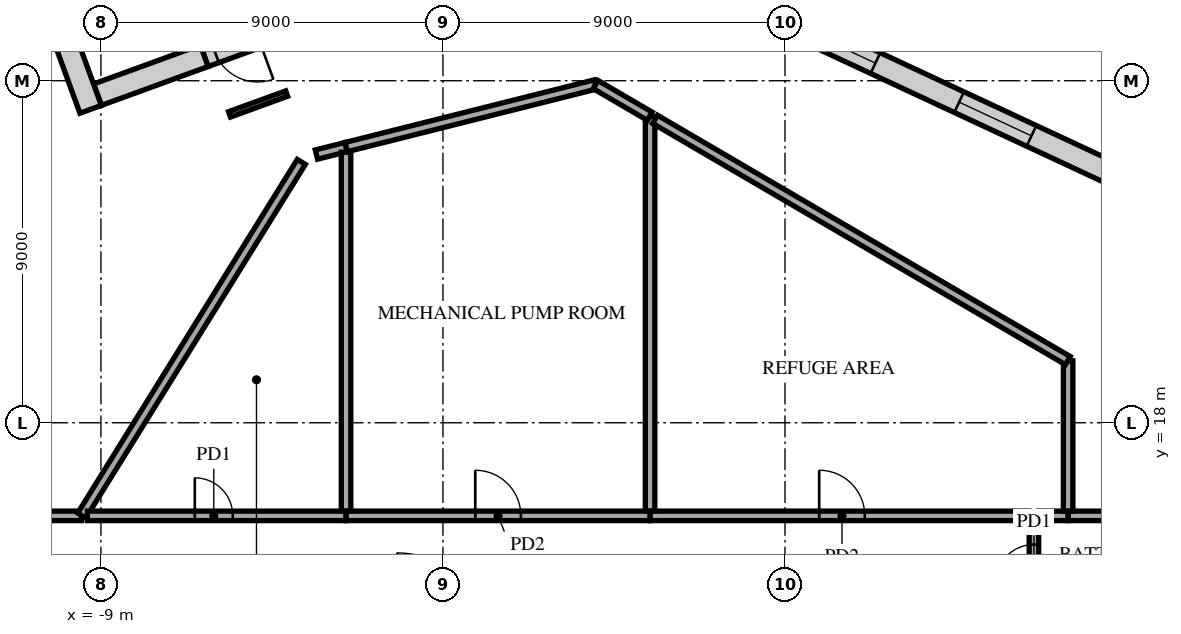
"""IFC4 building model, lengths in metres.
Left out: names, types, materials, properties, quantities, classifications, styles, units other than length and angle.
Written with IfcOpenShell. Run it as: python <this file> out.ifc"""

import sys

from ifc_helpers import new_model, si_unit, direction, frame, frame_2d, origin, place, context, subcontext, project, spatial, rectangle, extrude, element, fill, save


model = new_model("IFC4")
c1 = context("Model", 3, precision=1e-05, world=origin(), true_north=direction((0.0, 1.0)))
c2 = subcontext(c1, "Body", "Model", "MODEL_VIEW")
j1 = project(units=[si_unit("LENGTHUNIT", "METRE"), si_unit("PLANEANGLEUNIT", "RADIAN")], contexts=[c1])
p1 = place(None, origin())
s1 = spatial("IfcSite", under=j1, at=p1, CompositionType="ELEMENT")
p2 = place(p1, origin())
s2 = spatial("IfcBuilding", under=s1, at=p2, CompositionType="ELEMENT")
p3 = place(p2, frame((0.0, 0.0, 290.9)))
s3 = spatial("IfcBuildingStorey", under=s2, at=p3, CompositionType="ELEMENT", Elevation=290.9)
p4 = place(p3, frame((15.55, 13.045, 0.0), z_axis=(0.0, 0.0, 1.0), x_axis=(0.0, 1.0, 0.0)))
e1 = element("IfcWall", 1, at=p4, inside=s3, PredefinedType="PARTITIONING", context=c2, shape_type="SweptSolid", body=[
    extrude(rectangle(XDim=2.505, YDim=0.25, at=frame_2d((1.252, 0.0))), origin(), (0.0, 0.0, 1.0), 4.73),
])
p5 = place(p4, frame((0.75, 0.0, 0.0)))
e2 = element("IfcOpeningElement", 2, at=p5, cuts=e1, PredefinedType="OPENING", context=c2, shape_type="SweptSolid", body=[
    extrude(rectangle(XDim=1.0, YDim=2.1, at=frame_2d((0.5, 1.05))), frame((0.0, 0.135, 0.0), z_axis=(0.0, -1.0, 0.0), x_axis=(1.0, 0.0, 0.0)), (0.0, 0.0, 1.0), 0.27),
])
p6 = place(p3, frame((-15.42, 15.55, 0.0), z_axis=(0.0, 0.0, 1.0), x_axis=(1.0, 0.0, 0.0)))
e3 = element("IfcWall", 3, at=p6, inside=s3, PredefinedType="PARTITIONING", context=c2, shape_type="SweptSolid", body=[
    extrude(rectangle(XDim=5.91, YDim=0.25, at=frame_2d((2.955, 0.0))), origin(), (0.0, 0.0, 1.0), 4.43),
])
p7 = place(p3, frame((-9.505, 15.558, 0.0), z_axis=(0.0, 0.0, 1.0), x_axis=(0.527494346157, 0.84955854111, 0.0)))
e4 = element("IfcWall", 4, at=p7, inside=s3, PredefinedType="PARTITIONING", context=c2, shape_type="SweptSolid", body=[
    extrude(rectangle(XDim=10.954, YDim=0.25, at=frame_2d((5.477, 0.0))), origin(), (0.0, 0.0, 1.0), 4.73),
])
p8 = place(p3, frame((-9.357, 15.55, 0.0), z_axis=(0.0, 0.0, 1.0), x_axis=(1.0, 0.0, 0.0)))
e5 = element("IfcWall", 5, at=p8, inside=s3, PredefinedType="PARTITIONING", context=c2, shape_type="SweptSolid", body=[
    extrude(rectangle(XDim=6.807, YDim=0.25, at=frame_2d((3.404, 0.0))), origin(), (0.0, 0.0, 1.0), 4.73),
])
p9 = place(p8, frame((2.827, 0.0, 0.0)))
e6 = element("IfcOpeningElement", 6, at=p9, cuts=e5, PredefinedType="OPENING", context=c2, shape_type="SweptSolid", body=[
    extrude(rectangle(XDim=1.0, YDim=2.1, at=frame_2d((0.5, 1.05))), frame((0.0, 0.135, 0.0), z_axis=(0.0, -1.0, 0.0), x_axis=(1.0, 0.0, 0.0)), (0.0, 0.0, 1.0), 0.27),
])
p10 = place(p3, frame((-2.545, 15.55, 0.0), z_axis=(0.0, 0.0, 1.0), x_axis=(1.0, 0.0, 0.0)))
e7 = element("IfcWall", 7, at=p10, inside=s3, PredefinedType="PARTITIONING", context=c2, shape_type="SweptSolid", body=[
    extrude(rectangle(XDim=7.995, YDim=0.25, at=frame_2d((3.998, 0.0))), origin(), (0.0, 0.0, 1.0), 4.73),
])
p11 = place(p10, frame((3.395, 0.0, 0.0)))
e8 = element("IfcOpeningElement", 8, at=p11, cuts=e7, PredefinedType="OPENING", context=c2, shape_type="SweptSolid", body=[
    extrude(rectangle(XDim=1.2, YDim=2.1, at=frame_2d((0.6, 1.05))), frame((0.0, 0.135, 0.0), z_axis=(0.0, -1.0, 0.0), x_axis=(1.0, 0.0, 0.0)), (0.0, 0.0, 1.0), 0.27),
])
p12 = place(p3, frame((5.455, 15.55, 0.0), z_axis=(0.0, 0.0, 1.0), x_axis=(1.0, 0.0, 0.0)))
e9 = element("IfcWall", 9, at=p12, inside=s3, PredefinedType="PARTITIONING", context=c2, shape_type="SweptSolid", body=[
    extrude(rectangle(XDim=9.965, YDim=0.25, at=frame_2d((4.982, 0.0))), origin(), (0.0, 0.0, 1.0), 4.73),
])
p13 = place(p12, frame((4.445, 0.0, 0.0)))
e10 = element("IfcOpeningElement", 10, at=p13, cuts=e9, PredefinedType="OPENING", context=c2, shape_type="SweptSolid", body=[
    extrude(rectangle(XDim=1.2, YDim=2.1, at=frame_2d((0.6, 1.05))), frame((0.0, 0.135, 0.0), z_axis=(0.0, -1.0, 0.0), x_axis=(1.0, 0.0, 0.0)), (0.0, 0.0, 1.0), 0.27),
])
p14 = place(p3, frame((15.68, 15.55, 0.0), z_axis=(0.0, 0.0, 1.0), x_axis=(1.0, 0.0, 0.0)))
e11 = element("IfcWall", 11, at=p14, inside=s3, PredefinedType="PARTITIONING", context=c2, shape_type="SweptSolid", body=[
    extrude(rectangle(XDim=0.77, YDim=0.25, at=frame_2d((0.385, 0.0))), origin(), (0.0, 0.0, 1.0), 5.25),
])
p15 = place(p3, frame((16.455, 15.55, 0.0), z_axis=(0.0, 0.0, 1.0), x_axis=(1.0, 0.0, 0.0)))
e12 = element("IfcWall", 12, at=p15, inside=s3, PredefinedType="PARTITIONING", context=c2, shape_type="SweptSolid", body=[
    extrude(rectangle(XDim=5.668, YDim=0.25, at=frame_2d((2.834, 0.0))), origin(), (0.0, 0.0, 1.0), 4.73),
])
p16 = place(p3, frame((16.45, 15.68, 0.0), z_axis=(0.0, 0.0, 1.0), x_axis=(0.0, 1.0, 0.0)))
e13 = element("IfcWall", 13, at=p16, inside=s3, PredefinedType="PARTITIONING", context=c2, shape_type="SweptSolid", body=[
    extrude(rectangle(XDim=3.952, YDim=0.25, at=frame_2d((1.976, 0.0))), origin(), (0.0, 0.0, 1.0), 4.73),
])
p17 = place(p3, frame((-3.33, 25.057, 0.0), z_axis=(0.0, 0.0, 1.0), x_axis=(0.969820148619, 0.243821408685, 0.0)))
e14 = element("IfcWall", 14, at=p17, inside=s3, PredefinedType="PARTITIONING", context=c2, shape_type="SweptSolid", body=[
    extrude(rectangle(XDim=0.804, YDim=0.25, at=frame_2d((0.402, 0.0))), origin(), (0.0, 0.0, 1.0), 5.25),
])
p18 = place(p3, frame((-2.55, 15.68, 0.0), z_axis=(0.0, 0.0, 1.0), x_axis=(0.0, 1.0, 0.0)))
e15 = element("IfcWall", 15, at=p18, inside=s3, PredefinedType="PARTITIONING", context=c2, shape_type="SweptSolid", body=[
    extrude(rectangle(XDim=9.439, YDim=0.25, at=frame_2d((4.72, 0.0))), origin(), (0.0, 0.0, 1.0), 5.25),
])
p19 = place(p3, frame((-2.545, 25.255, 0.0), z_axis=(0.0, 0.0, 1.0), x_axis=(0.969855051693, 0.243682536725, 0.0)))
e16 = element("IfcWall", 16, at=p19, inside=s3, PredefinedType="PARTITIONING", context=c2, shape_type="SweptSolid", body=[
    extrude(rectangle(XDim=6.761, YDim=0.25, at=frame_2d((3.38, 0.0))), origin(), (0.0, 0.0, 1.0), 4.416),
])
p20 = place(p3, frame((5.45, 15.68, 0.0), z_axis=(0.0, 0.0, 1.0), x_axis=(0.0, 1.0, 0.0)))
e17 = element("IfcWall", 17, at=p20, inside=s3, PredefinedType="PARTITIONING", context=c2, shape_type="SweptSolid", body=[
    extrude(rectangle(XDim=10.381, YDim=0.25, at=frame_2d((5.191, 0.0))), origin(), (0.0, 0.0, 1.0), 5.25),
])
p21 = place(p3, frame((5.58, 25.985, 0.0), z_axis=(0.0, 0.0, 1.0), x_axis=(0.863333734734, -0.504633394129, 0.0)))
e18 = element("IfcWall", 18, at=p21, inside=s3, PredefinedType="PARTITIONING", context=c2, shape_type="SweptSolid", body=[
    extrude(rectangle(XDim=12.581, YDim=0.25, at=frame_2d((6.29, 0.0))), origin(), (0.0, 0.0, 1.0), 4.73),
])
p22 = place(p3, frame((4.018, 26.898, 0.0), z_axis=(0.0, 0.0, 1.0), x_axis=(0.863392044952, -0.504533622976, 0.0)))
e19 = element("IfcWall", 19, at=p22, inside=s3, PredefinedType="PARTITIONING", context=c2, shape_type="SweptSolid", body=[
    extrude(rectangle(XDim=1.649, YDim=0.25, at=frame_2d((0.825, 0.0))), origin(), (0.0, 0.0, 1.0), 4.416),
])
p23 = place(p3, frame((28.904, 19.292, 0.0), z_axis=(0.0, 0.0, 1.0), x_axis=(-0.906308899711, 0.422615875594, 0.0)))
e20 = element("IfcWall", 20, at=p23, inside=s3, PredefinedType="STANDARD", context=c2, shape_type="SweptSolid", body=[
    extrude(rectangle(XDim=36.243, YDim=0.6, at=frame_2d((18.122, 0.0))), origin(), (0.0, 0.0, 1.0), 5.25),
])
p24 = place(p23, frame((1.215, 0.0, 0.6)))
e21 = element("IfcOpeningElement", 21, at=p24, cuts=e20, PredefinedType="OPENING", context=c2, shape_type="SweptSolid", body=[
    extrude(rectangle(XDim=2.1, YDim=4.2, at=frame_2d((1.05, 2.1))), frame((0.0, 0.31, 0.0), z_axis=(0.0, -1.0, 0.0), x_axis=(1.0, 0.0, 0.0)), (0.0, 0.0, 1.0), 0.62),
])
p25 = place(p23, frame((14.806, 0.0, 0.6)))
e22 = element("IfcOpeningElement", 22, at=p25, cuts=e20, PredefinedType="OPENING", context=c2, shape_type="SweptSolid", body=[
    extrude(rectangle(XDim=2.1, YDim=4.2, at=frame_2d((1.05, 2.1))), frame((0.0, 0.31, 0.0), z_axis=(0.0, -1.0, 0.0), x_axis=(1.0, 0.0, 0.0)), (0.0, 0.0, 1.0), 0.62),
])
p26 = place(p23, frame((19.337, 0.0, 0.6)))
e23 = element("IfcOpeningElement", 23, at=p26, cuts=e20, PredefinedType="OPENING", context=c2, shape_type="SweptSolid", body=[
    extrude(rectangle(XDim=2.1, YDim=4.2, at=frame_2d((1.05, 2.1))), frame((0.0, 0.31, 0.0), z_axis=(0.0, -1.0, 0.0), x_axis=(1.0, 0.0, 0.0)), (0.0, 0.0, 1.0), 0.62),
])
p27 = place(p23, frame((23.867, 0.0, 0.6)))
e24 = element("IfcOpeningElement", 24, at=p27, cuts=e20, PredefinedType="OPENING", context=c2, shape_type="SweptSolid", body=[
    extrude(rectangle(XDim=2.1, YDim=4.2, at=frame_2d((1.05, 2.1))), frame((0.0, 0.31, 0.0), z_axis=(0.0, -1.0, 0.0), x_axis=(1.0, 0.0, 0.0)), (0.0, 0.0, 1.0), 0.62),
])
p28 = place(p23, frame((28.398, 0.0, 0.6)))
e25 = element("IfcOpeningElement", 25, at=p28, cuts=e20, PredefinedType="OPENING", context=c2, shape_type="SweptSolid", body=[
    extrude(rectangle(XDim=2.1, YDim=4.2, at=frame_2d((1.05, 2.1))), frame((0.0, 0.31, 0.0), z_axis=(0.0, -1.0, 0.0), x_axis=(1.0, 0.0, 0.0)), (0.0, 0.0, 1.0), 0.62),
])
p29 = place(p23, frame((32.928, 0.0, 0.6)))
e26 = element("IfcOpeningElement", 26, at=p29, cuts=e20, PredefinedType="OPENING", context=c2, shape_type="SweptSolid", body=[
    extrude(rectangle(XDim=2.1, YDim=4.2, at=frame_2d((1.05, 2.1))), frame((0.0, 0.31, 0.0), z_axis=(0.0, -1.0, 0.0), x_axis=(1.0, 0.0, 0.0)), (0.0, 0.0, 1.0), 0.62),
])
p30 = place(p3, frame((-4.591, 28.271, 0.0), z_axis=(0.0, 0.0, 1.0), x_axis=(-0.939674562916, -0.34206975284, 0.0)))
e27 = element("IfcWall", 27, at=p30, inside=s3, PredefinedType="STANDARD", context=c2, shape_type="SweptSolid", body=[
    extrude(rectangle(XDim=1.8, YDim=0.6, at=frame_2d((0.9, 0.0))), origin(), (0.0, 0.0, 1.0), 5.25),
])
p31 = place(p30, frame((0.3, 0.0, 0.0)))
e28 = element("IfcOpeningElement", 28, at=p31, cuts=e27, PredefinedType="OPENING", context=c2, shape_type="SweptSolid", body=[
    extrude(rectangle(XDim=1.2, YDim=2.4, at=frame_2d((0.6, 1.2))), frame((0.0, 0.31, 0.0), z_axis=(0.0, -1.0, 0.0), x_axis=(1.0, 0.0, 0.0)), (0.0, 0.0, 1.0), 0.62),
])
p32 = place(p3, frame((-4.112, 26.663, 0.0), z_axis=(0.0, 0.0, 1.0), x_axis=(-0.939677550088, -0.34206154689, 0.0)))
e29 = element("IfcWall", 29, at=p32, inside=s3, PredefinedType="PARTITIONING", context=c2, shape_type="SweptSolid", body=[
    extrude(rectangle(XDim=1.6, YDim=0.15, at=frame_2d((0.8, 0.0))), origin(), (0.0, 0.0, 1.0), 0.7),
])
p33 = place(p3, frame((-6.283, 27.655, 0.0), z_axis=(0.0, 0.0, 1.0), x_axis=(-0.939705156098, -0.341985700876, 0.0)))
e30 = element("IfcWall", 30, at=p33, inside=s3, PredefinedType="STANDARD", context=c2, shape_type="SweptSolid", body=[
    extrude(rectangle(XDim=2.989, YDim=0.6, at=frame_2d((1.495, 0.0))), origin(), (0.0, 0.0, 1.0), 5.25),
])
p34 = place(p3, frame((-9.271, 26.248, 0.0), z_axis=(0.0, 0.0, 1.0), x_axis=(-0.342034902057, 0.939687248916, 0.0)))
e31 = element("IfcWall", 31, at=p34, inside=s3, PredefinedType="STANDARD", context=c2, shape_type="SweptSolid", body=[
    extrude(rectangle(XDim=6.246, YDim=0.6, at=frame_2d((3.123, 0.0))), origin(), (0.0, 0.0, 1.0), 5.25),
])
p35 = place(p9, origin())
e32 = element("IfcDoor", 32, at=p35, inside=s3, OperationType="SINGLE_SWING_RIGHT", PredefinedType="DOOR", context=c2, shape_type="SweptSolid", body=[
    extrude(rectangle(XDim=1.0, YDim=2.1, at=frame_2d((0.5, 1.05))), frame((0.0, 0.025, 0.0), z_axis=(0.0, -1.0, 0.0), x_axis=(1.0, 0.0, 0.0)), (0.0, 0.0, 1.0), 0.05),
])
fill(e6, e32)
p36 = place(p11, origin())
e33 = element("IfcDoor", 33, at=p36, inside=s3, OperationType="SINGLE_SWING_LEFT", PredefinedType="DOOR", context=c2, shape_type="SweptSolid", body=[
    extrude(rectangle(XDim=1.2, YDim=2.1, at=frame_2d((0.6, 1.05))), frame((0.0, 0.025, 0.0), z_axis=(0.0, -1.0, 0.0), x_axis=(1.0, 0.0, 0.0)), (0.0, 0.0, 1.0), 0.05),
])
fill(e8, e33)
p37 = place(p13, origin())
e34 = element("IfcDoor", 34, at=p37, inside=s3, OperationType="SINGLE_SWING_RIGHT", PredefinedType="DOOR", context=c2, shape_type="SweptSolid", body=[
    extrude(rectangle(XDim=1.2, YDim=2.1, at=frame_2d((0.6, 1.05))), frame((0.0, 0.025, 0.0), z_axis=(0.0, -1.0, 0.0), x_axis=(1.0, 0.0, 0.0)), (0.0, 0.0, 1.0), 0.05),
])
fill(e10, e34)
p38 = place(p5, origin())
e35 = element("IfcDoor", 35, at=p38, inside=s3, OperationType="SINGLE_SWING_LEFT", PredefinedType="DOOR", context=c2, shape_type="SweptSolid", body=[
    extrude(rectangle(XDim=1.0, YDim=2.1, at=frame_2d((0.5, 1.05))), frame((0.0, 0.025, 0.0), z_axis=(0.0, -1.0, 0.0), x_axis=(1.0, 0.0, 0.0)), (0.0, 0.0, 1.0), 0.05),
])
fill(e2, e35)
p39 = place(p25, origin())
e36 = element("IfcWindow", 36, at=p39, inside=s3, PartitioningType="SINGLE_PANEL", PredefinedType="USERDEFINED", context=c2, shape_type="SweptSolid", body=[
    extrude(rectangle(XDim=2.1, YDim=4.2, at=frame_2d((1.05, 2.1))), frame((0.0, 0.03, 0.0), z_axis=(0.0, -1.0, 0.0), x_axis=(1.0, 0.0, 0.0)), (0.0, 0.0, 1.0), 0.06),
])
fill(e22, e36)
p40 = place(p26, origin())
e37 = element("IfcWindow", 37, at=p40, inside=s3, PartitioningType="SINGLE_PANEL", PredefinedType="USERDEFINED", context=c2, shape_type="SweptSolid", body=[
    extrude(rectangle(XDim=2.1, YDim=4.2, at=frame_2d((1.05, 2.1))), frame((0.0, 0.03, 0.0), z_axis=(0.0, -1.0, 0.0), x_axis=(1.0, 0.0, 0.0)), (0.0, 0.0, 1.0), 0.06),
])
fill(e23, e37)
p41 = place(p31, origin())
e38 = element("IfcDoor", 38, at=p41, inside=s3, OperationType="SINGLE_SWING_LEFT", PredefinedType="DOOR", context=c2, shape_type="SweptSolid", body=[
    extrude(rectangle(XDim=1.2, YDim=2.4, at=frame_2d((0.6, 1.2))), frame((0.0, 0.025, 0.0), z_axis=(0.0, -1.0, 0.0), x_axis=(1.0, 0.0, 0.0)), (0.0, 0.0, 1.0), 0.05),
])
fill(e28, e38)
save(model, sys.argv[1])
